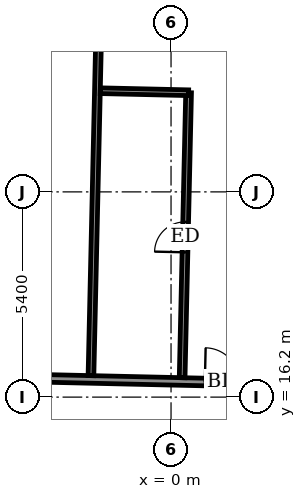
"""IFC4 building model, lengths in metres.
Left out: names, types, materials, properties, quantities, classifications, styles, units other than length and angle.
Written with IfcOpenShell. Run it as: python <this file> out.ifc"""

import sys

from ifc_helpers import new_model, si_unit, direction, frame, frame_2d, origin, place, context, subcontext, project, spatial, rectangle, extrude, element, fill, save


model = new_model("IFC4")
c1 = context("Model", 3, precision=1e-05, world=origin(), true_north=direction((0.0, 1.0)))
c2 = subcontext(c1, "Body", "Model", "MODEL_VIEW")
j1 = project(units=[si_unit("LENGTHUNIT", "METRE"), si_unit("PLANEANGLEUNIT", "RADIAN")], contexts=[c1])
p1 = place(None, origin())
s1 = spatial("IfcSite", under=j1, at=p1, CompositionType="ELEMENT")
p2 = place(p1, origin())
s2 = spatial("IfcBuilding", under=s1, at=p2, CompositionType="ELEMENT")
p3 = place(p2, frame((0.0, 0.0, 309.7)))
s3 = spatial("IfcBuildingStorey", under=s2, at=p3, CompositionType="ELEMENT", Elevation=309.7)
p4 = place(p3, frame((-30.652, 17.313, 0.0), z_axis=(0.0, 0.0, 1.0), x_axis=(0.999742623764, -0.02268669719, 0.0)))
e1 = element("IfcWall", 1, at=p4, inside=s3, PredefinedType="PARTITIONING", context=c2, shape_type="SweptSolid", body=[
    extrude(rectangle(XDim=58.8, YDim=0.2, at=frame_2d((29.4, 0.0))), origin(), (0.0, 0.0, 1.0), 3.05),
])
p5 = place(p4, frame((54.601, 0.0, 0.0)))
e2 = element("IfcOpeningElement", 2, at=p5, cuts=e1, PredefinedType="OPENING", context=c2, shape_type="SweptSolid", body=[
    extrude(rectangle(XDim=1.0, YDim=2.1, at=frame_2d((0.5, 1.05))), frame((0.0, 0.11, 0.0), z_axis=(0.0, -1.0, 0.0), x_axis=(1.0, 0.0, 0.0)), (0.0, 0.0, 1.0), 0.22),
])
p6 = place(p4, frame((49.35, 0.0, 0.0)))
e3 = element("IfcOpeningElement", 3, at=p6, cuts=e1, PredefinedType="OPENING", context=c2, shape_type="SweptSolid", body=[
    extrude(rectangle(XDim=0.9, YDim=2.1, at=frame_2d((0.45, 1.05))), frame((0.0, 0.11, 0.0), z_axis=(0.0, -1.0, 0.0), x_axis=(1.0, 0.0, 0.0)), (0.0, 0.0, 1.0), 0.22),
])
p7 = place(p4, frame((42.55, 0.0, 0.0)))
e4 = element("IfcOpeningElement", 4, at=p7, cuts=e1, PredefinedType="OPENING", context=c2, shape_type="SweptSolid", body=[
    extrude(rectangle(XDim=0.9, YDim=2.1, at=frame_2d((0.45, 1.05))), frame((0.0, 0.11, 0.0), z_axis=(0.0, -1.0, 0.0), x_axis=(1.0, 0.0, 0.0)), (0.0, 0.0, 1.0), 0.22),
])
p8 = place(p4, frame((40.475, 0.0, 0.0)))
e5 = element("IfcOpeningElement", 5, at=p8, cuts=e1, PredefinedType="OPENING", context=c2, shape_type="SweptSolid", body=[
    extrude(rectangle(XDim=0.9, YDim=2.1, at=frame_2d((0.45, 1.05))), frame((0.0, 0.11, 0.0), z_axis=(0.0, -1.0, 0.0), x_axis=(1.0, 0.0, 0.0)), (0.0, 0.0, 1.0), 0.22),
])
p9 = place(p4, frame((33.6, 0.0, 0.0)))
e6 = element("IfcOpeningElement", 6, at=p9, cuts=e1, PredefinedType="OPENING", context=c2, shape_type="SweptSolid", body=[
    extrude(rectangle(XDim=0.9, YDim=2.1, at=frame_2d((0.45, 1.05))), frame((0.0, 0.11, 0.0), z_axis=(0.0, -1.0, 0.0), x_axis=(1.0, 0.0, 0.0)), (0.0, 0.0, 1.0), 0.22),
])
p10 = place(p4, frame((31.55, 0.0, 0.0)))
e7 = element("IfcOpeningElement", 7, at=p10, cuts=e1, PredefinedType="OPENING", context=c2, shape_type="SweptSolid", body=[
    extrude(rectangle(XDim=0.9, YDim=2.1, at=frame_2d((0.45, 1.05))), frame((0.0, 0.11, 0.0), z_axis=(0.0, -1.0, 0.0), x_axis=(1.0, 0.0, 0.0)), (0.0, 0.0, 1.0), 0.22),
])
p11 = place(p4, frame((24.425, 0.0, 0.0)))
e8 = element("IfcOpeningElement", 8, at=p11, cuts=e1, PredefinedType="OPENING", context=c2, shape_type="SweptSolid", body=[
    extrude(rectangle(XDim=0.9, YDim=2.1, at=frame_2d((0.45, 1.05))), frame((0.0, 0.11, 0.0), z_axis=(0.0, -1.0, 0.0), x_axis=(1.0, 0.0, 0.0)), (0.0, 0.0, 1.0), 0.22),
])
p12 = place(p4, frame((22.05, 0.0, 0.0)))
e9 = element("IfcOpeningElement", 9, at=p12, cuts=e1, PredefinedType="OPENING", context=c2, shape_type="SweptSolid", body=[
    extrude(rectangle(XDim=0.9, YDim=2.1, at=frame_2d((0.45, 1.05))), frame((0.0, 0.11, 0.0), z_axis=(0.0, -1.0, 0.0), x_axis=(1.0, 0.0, 0.0)), (0.0, 0.0, 1.0), 0.22),
])
p13 = place(p4, frame((14.95, 0.0, 0.0)))
e10 = element("IfcOpeningElement", 10, at=p13, cuts=e1, PredefinedType="OPENING", context=c2, shape_type="SweptSolid", body=[
    extrude(rectangle(XDim=0.9, YDim=2.1, at=frame_2d((0.45, 1.05))), frame((0.0, 0.11, 0.0), z_axis=(0.0, -1.0, 0.0), x_axis=(1.0, 0.0, 0.0)), (0.0, 0.0, 1.0), 0.22),
])
p14 = place(p4, frame((12.525, 0.0, 0.0)))
e11 = element("IfcOpeningElement", 11, at=p14, cuts=e1, PredefinedType="OPENING", context=c2, shape_type="SweptSolid", body=[
    extrude(rectangle(XDim=0.9, YDim=2.1, at=frame_2d((0.45, 1.05))), frame((0.0, 0.11, 0.0), z_axis=(0.0, -1.0, 0.0), x_axis=(1.0, 0.0, 0.0)), (0.0, 0.0, 1.0), 0.22),
])
p15 = place(p4, frame((4.032, 0.0, 0.0)))
e12 = element("IfcOpeningElement", 12, at=p15, cuts=e1, PredefinedType="OPENING", context=c2, shape_type="SweptSolid", body=[
    extrude(rectangle(XDim=1.0, YDim=2.1, at=frame_2d((0.5, 1.05))), frame((0.0, 0.11, 0.0), z_axis=(0.0, -1.0, 0.0), x_axis=(1.0, 0.0, 0.0)), (0.0, 0.0, 1.0), 0.22),
])
p16 = place(p3, frame((-2.107, 16.765, 0.0), z_axis=(0.0, 0.0, 1.0), x_axis=(0.022661029756, 0.999743205894, 0.0)))
e13 = element("IfcWall", 13, at=p16, inside=s3, PredefinedType="PARTITIONING", context=c2, shape_type="SweptSolid", body=[
    extrude(rectangle(XDim=12.4, YDim=0.15, at=frame_2d((6.2, 0.0))), origin(), (0.0, 0.0, 1.0), 2.5),
])
p17 = place(p3, frame((0.292, 16.711, 0.0), z_axis=(0.0, 0.0, 1.0), x_axis=(0.022656334507, 0.999743312309, 0.0)))
e14 = element("IfcWall", 14, at=p17, inside=s3, PredefinedType="PARTITIONING", context=c2, shape_type="SweptSolid", body=[
    extrude(rectangle(XDim=7.5, YDim=0.15, at=frame_2d((3.75, 0.0))), origin(), (0.0, 0.0, 1.0), 3.05),
])
p18 = place(p17, frame((3.3, 0.0, 0.0)))
e15 = element("IfcOpeningElement", 15, at=p18, cuts=e14, PredefinedType="OPENING", context=c2, shape_type="SweptSolid", body=[
    extrude(rectangle(XDim=0.8, YDim=2.1, at=frame_2d((0.4, 1.05))), frame((0.0, 0.085, 0.0), z_axis=(0.0, -1.0, 0.0), x_axis=(1.0, 0.0, 0.0)), (0.0, 0.0, 1.0), 0.17),
])
p19 = place(p3, frame((-1.862, 24.262, 0.0), z_axis=(0.0, 0.0, 1.0), x_axis=(0.999740260747, -0.02279059109, 0.0)))
e16 = element("IfcWall", 16, at=p19, inside=s3, PredefinedType="PARTITIONING", context=c2, shape_type="SweptSolid", body=[
    extrude(rectangle(XDim=2.324, YDim=0.15, at=frame_2d((1.162, 0.0))), origin(), (0.0, 0.0, 1.0), 3.05),
])
p20 = place(p10, origin())
e17 = element("IfcDoor", 17, at=p20, inside=s3, OperationType="SINGLE_SWING_LEFT", PredefinedType="DOOR", context=c2, shape_type="SweptSolid", body=[
    extrude(rectangle(XDim=0.9, YDim=2.1, at=frame_2d((0.45, 1.05))), frame((0.0, 0.025, 0.0), z_axis=(0.0, -1.0, 0.0), x_axis=(1.0, 0.0, 0.0)), (0.0, 0.0, 1.0), 0.05),
])
fill(e7, e17)
p21 = place(p18, origin())
e18 = element("IfcDoor", 18, at=p21, inside=s3, OperationType="SINGLE_SWING_LEFT", PredefinedType="DOOR", context=c2, shape_type="SweptSolid", body=[
    extrude(rectangle(XDim=0.8, YDim=2.1, at=frame_2d((0.4, 1.05))), frame((0.0, 0.025, 0.0), z_axis=(0.0, -1.0, 0.0), x_axis=(1.0, 0.0, 0.0)), (0.0, 0.0, 1.0), 0.05),
])
fill(e15, e18)
save(model, sys.argv[1])
